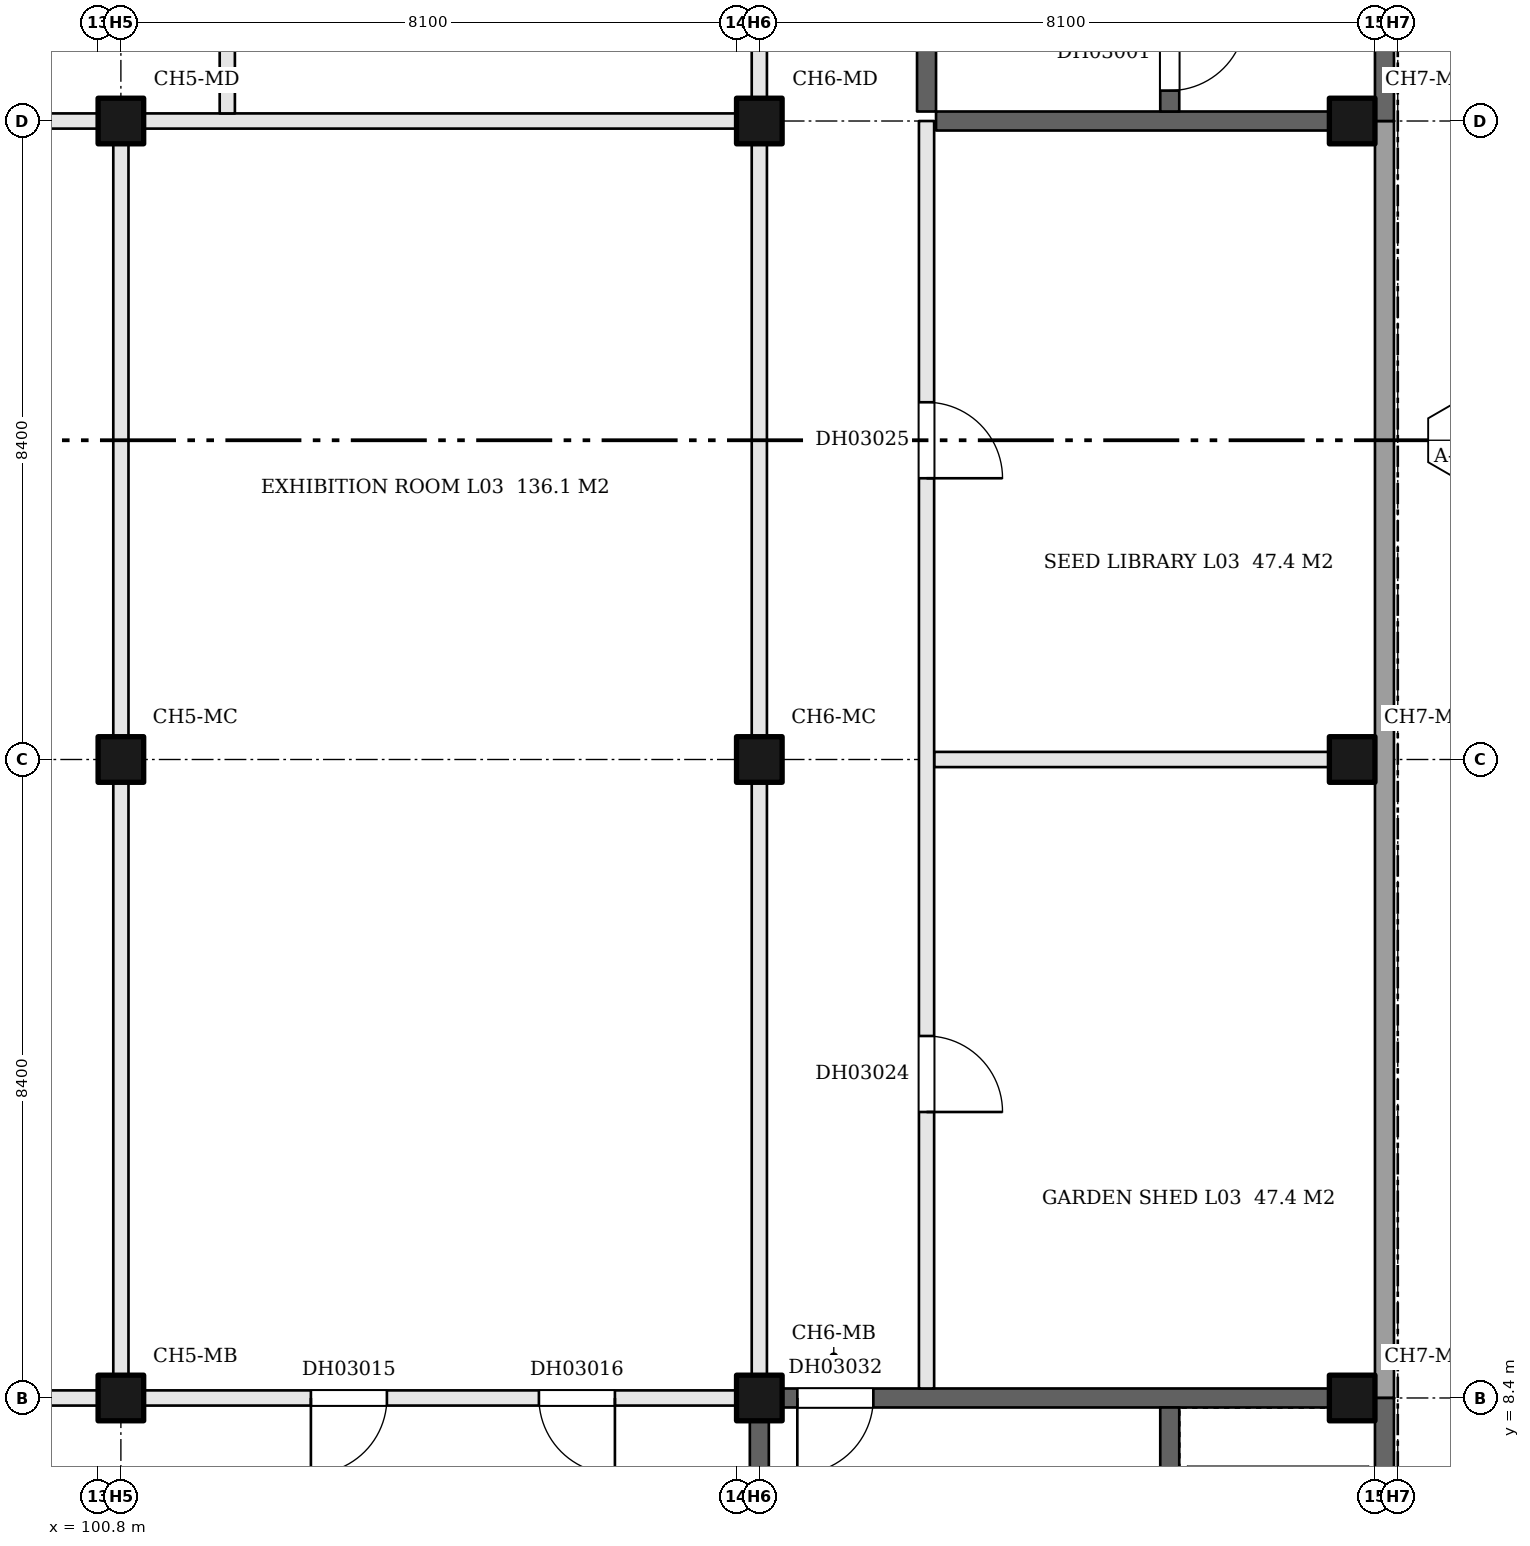
"""IFC4 building model, lengths in metres.
Left out: names, types, materials, properties, quantities, classifications, styles, units other than length and angle.
Written with IfcOpenShell. Run it as: python <this file> out.ifc"""

import sys

from ifc_helpers import new_model, si_unit, direction, frame, frame_2d, origin, origin_2d, place, context, subcontext, project, spatial, rectangle, extrude, element, fill, save


model = new_model("IFC4")
c1 = context("Model", 3, precision=1e-05, world=origin(), true_north=direction((0.0, 1.0)))
c2 = subcontext(c1, "Body", "Model", "MODEL_VIEW")
j1 = project(units=[si_unit("LENGTHUNIT", "METRE"), si_unit("PLANEANGLEUNIT", "RADIAN")], contexts=[c1])
p1 = place(None, origin())
s1 = spatial("IfcSite", under=j1, at=p1, CompositionType="ELEMENT")
p2 = place(p1, origin())
s2 = spatial("IfcBuilding", under=s1, at=p2, CompositionType="ELEMENT")
p3 = place(p2, frame((0.0, 0.0, 19.8)))
s3 = spatial("IfcBuildingStorey", under=s2, at=p3, CompositionType="ELEMENT", Elevation=19.8)
for number, where, z_axis, x_axis in (
    (1, (101.1, 8.4, 0.0), (0.0, 0.0, 1.0), (1.0, 0.0, 0.0)),
    (2, (101.1, 16.8, 0.0), (0.0, 0.0, 1.0), (1.0, 0.0, 0.0)),
    (3, (101.1, 25.2, 0.0), (0.0, 0.0, 1.0), (1.0, 0.0, 0.0)),
    (4, (109.5, 8.4, 0.0), (0.0, 0.0, 1.0), (1.0, 0.0, 0.0)),
    (5, (109.5, 16.8, 0.0), (0.0, 0.0, 1.0), (1.0, 0.0, 0.0)),
    (6, (109.5, 25.2, 0.0), (0.0, 0.0, 1.0), (1.0, 0.0, 0.0)),
    (7, (117.3, 8.4, 0.0), (0.0, 0.0, 1.0), (1.0, 0.0, 0.0)),
    (8, (117.3, 16.8, 0.0), (0.0, 0.0, 1.0), (1.0, 0.0, 0.0)),
    (9, (117.3, 25.2, 0.0), (0.0, 0.0, 1.0), (1.0, 0.0, 0.0)),
):
    element("IfcColumn", number, at=place(p3, frame(where, z_axis=z_axis, x_axis=x_axis)), inside=s3, PredefinedType="COLUMN", context=c2, shape_type="SweptSolid", body=[
        extrude(rectangle(XDim=0.6, YDim=0.6, at=origin_2d()), origin(), (0.0, 0.0, 1.0), 5.0),
    ])
p4 = place(p3, frame((93.0, 8.4, 0.0), z_axis=(0.0, 0.0, 1.0), x_axis=(1.0, 0.0, 0.0)))
e10 = element("IfcWall", 10, at=p4, inside=s3, PredefinedType="PARTITIONING", context=c2, shape_type="SweptSolid", body=[
    extrude(rectangle(XDim=7.8, YDim=0.2, at=frame_2d((3.9, 0.0))), origin(), (0.0, 0.0, 1.0), 5.0),
])
p5 = place(p4, frame((2.2, 0.0, 0.0)))
e11 = element("IfcOpeningElement", 11, at=p5, cuts=e10, PredefinedType="OPENING", context=c2, shape_type="SweptSolid", body=[
    extrude(rectangle(XDim=1.0, YDim=2.1, at=frame_2d((0.5, 1.05))), frame((0.0, 0.11, 0.0), z_axis=(0.0, -1.0, 0.0), x_axis=(1.0, 0.0, 0.0)), (0.0, 0.0, 1.0), 0.22),
])
p6 = place(p4, frame((5.2, 0.0, 0.0)))
e12 = element("IfcOpeningElement", 12, at=p6, cuts=e10, PredefinedType="OPENING", context=c2, shape_type="SweptSolid", body=[
    extrude(rectangle(XDim=1.0, YDim=2.1, at=frame_2d((0.5, 1.05))), frame((0.0, 0.11, 0.0), z_axis=(0.0, -1.0, 0.0), x_axis=(1.0, 0.0, 0.0)), (0.0, 0.0, 1.0), 0.22),
])
p7 = place(p3, frame((101.4, 8.4, 0.0), z_axis=(0.0, 0.0, 1.0), x_axis=(1.0, 0.0, 0.0)))
e13 = element("IfcWall", 13, at=p7, inside=s3, PredefinedType="PARTITIONING", context=c2, shape_type="SweptSolid", body=[
    extrude(rectangle(XDim=7.8, YDim=0.2, at=frame_2d((3.9, 0.0))), origin(), (0.0, 0.0, 1.0), 5.0),
])
p8 = place(p7, frame((2.2, 0.0, 0.0)))
e14 = element("IfcOpeningElement", 14, at=p8, cuts=e13, PredefinedType="OPENING", context=c2, shape_type="SweptSolid", body=[
    extrude(rectangle(XDim=1.0, YDim=2.1, at=frame_2d((0.5, 1.05))), frame((0.0, 0.11, 0.0), z_axis=(0.0, -1.0, 0.0), x_axis=(1.0, 0.0, 0.0)), (0.0, 0.0, 1.0), 0.22),
])
p9 = place(p7, frame((5.2, 0.0, 0.0)))
e15 = element("IfcOpeningElement", 15, at=p9, cuts=e13, PredefinedType="OPENING", context=c2, shape_type="SweptSolid", body=[
    extrude(rectangle(XDim=1.0, YDim=2.1, at=frame_2d((0.5, 1.05))), frame((0.0, 0.11, 0.0), z_axis=(0.0, -1.0, 0.0), x_axis=(1.0, 0.0, 0.0)), (0.0, 0.0, 1.0), 0.22),
])
p10 = place(p3, frame((109.8, 8.4, 0.0), z_axis=(0.0, 0.0, 1.0), x_axis=(1.0, 0.0, 0.0)))
e16 = element("IfcWall", 16, at=p10, inside=s3, PredefinedType="SHEAR", context=c2, shape_type="SweptSolid", body=[
    extrude(rectangle(XDim=7.2, YDim=0.25, at=frame_2d((3.6, 0.0))), origin(), (0.0, 0.0, 1.0), 5.0),
])
p11 = place(p10, frame((0.2, 0.0, 0.0)))
e17 = element("IfcOpeningElement", 17, at=p11, cuts=e16, PredefinedType="OPENING", context=c2, shape_type="SweptSolid", body=[
    extrude(rectangle(XDim=1.0, YDim=2.1, at=frame_2d((0.5, 1.05))), frame((0.0, 0.135, 0.0), z_axis=(0.0, -1.0, 0.0), x_axis=(1.0, 0.0, 0.0)), (0.0, 0.0, 1.0), 0.27),
])
p12 = place(p3, frame((111.8, 16.8, 0.0), z_axis=(0.0, 0.0, 1.0), x_axis=(1.0, 0.0, 0.0)))
e18 = element("IfcWall", 18, at=p12, inside=s3, PredefinedType="PARTITIONING", context=c2, shape_type="SweptSolid", body=[
    extrude(rectangle(XDim=5.2, YDim=0.2, at=frame_2d((2.6, 0.0))), origin(), (0.0, 0.0, 1.0), 5.0),
])
for number, where, z_axis, x_axis in (
    (19, (93.0, 25.2, 0.0), (0.0, 0.0, 1.0), (1.0, 0.0, 0.0)),
    (20, (101.4, 25.2, 0.0), (0.0, 0.0, 1.0), (1.0, 0.0, 0.0)),
):
    element("IfcWall", number, at=place(p3, frame(where, z_axis=z_axis, x_axis=x_axis)), inside=s3, PredefinedType="PARTITIONING", context=c2, shape_type="SweptSolid", body=[
        extrude(rectangle(XDim=7.8, YDim=0.2, at=frame_2d((3.9, 0.0))), origin(), (0.0, 0.0, 1.0), 5.0),
    ])
p13 = place(p3, frame((111.825, 25.2, 0.0), z_axis=(0.0, 0.0, 1.0), x_axis=(1.0, 0.0, 0.0)))
e21 = element("IfcWall", 21, at=p13, inside=s3, PredefinedType="SHEAR", context=c2, shape_type="SweptSolid", body=[
    extrude(rectangle(XDim=5.175, YDim=0.25, at=frame_2d((2.587, 0.0))), origin(), (0.0, 0.0, 1.0), 5.0),
])
p14 = place(p3, frame((101.1, 8.7, 0.0), z_axis=(0.0, 0.0, 1.0), x_axis=(0.0, 1.0, 0.0)))
e22 = element("IfcWall", 22, at=p14, inside=s3, PredefinedType="PARTITIONING", context=c2, shape_type="SweptSolid", body=[
    extrude(rectangle(XDim=7.8, YDim=0.2, at=frame_2d((3.9, 0.0))), origin(), (0.0, 0.0, 1.0), 5.0),
])
p15 = place(p3, frame((101.1, 17.1, 0.0), z_axis=(0.0, 0.0, 1.0), x_axis=(0.0, 1.0, 0.0)))
e23 = element("IfcWall", 23, at=p15, inside=s3, PredefinedType="PARTITIONING", context=c2, shape_type="SweptSolid", body=[
    extrude(rectangle(XDim=7.8, YDim=0.2, at=frame_2d((3.9, 0.0))), origin(), (0.0, 0.0, 1.0), 5.0),
])
p16 = place(p3, frame((102.5, 25.3, 0.0), z_axis=(0.0, 0.0, 1.0), x_axis=(0.0, 1.0, 0.0)))
e24 = element("IfcWall", 24, at=p16, inside=s3, PredefinedType="PARTITIONING", context=c2, shape_type="SweptSolid", body=[
    extrude(rectangle(XDim=4.4, YDim=0.2, at=frame_2d((2.2, 0.0))), origin(), (0.0, 0.0, 1.0), 5.0),
])
p17 = place(p3, frame((109.5, 0.9, 0.0), z_axis=(0.0, 0.0, 1.0), x_axis=(0.0, 1.0, 0.0)))
e25 = element("IfcWall", 25, at=p17, inside=s3, PredefinedType="SHEAR", context=c2, shape_type="SweptSolid", body=[
    extrude(rectangle(XDim=7.2, YDim=0.25, at=frame_2d((3.6, 0.0))), origin(), (0.0, 0.0, 1.0), 5.0),
])
p18 = place(p17, frame((4.3, 0.0, 0.0)))
e26 = element("IfcOpeningElement", 26, at=p18, cuts=e25, PredefinedType="OPENING", context=c2, shape_type="SweptSolid", body=[
    extrude(rectangle(XDim=1.4, YDim=2.1, at=frame_2d((0.7, 1.05))), frame((0.0, 0.135, 0.0), z_axis=(0.0, -1.0, 0.0), x_axis=(1.0, 0.0, 0.0)), (0.0, 0.0, 1.0), 0.27),
])
p19 = place(p3, frame((109.5, 8.7, 0.0), z_axis=(0.0, 0.0, 1.0), x_axis=(0.0, 1.0, 0.0)))
e27 = element("IfcWall", 27, at=p19, inside=s3, PredefinedType="PARTITIONING", context=c2, shape_type="SweptSolid", body=[
    extrude(rectangle(XDim=7.8, YDim=0.2, at=frame_2d((3.9, 0.0))), origin(), (0.0, 0.0, 1.0), 5.0),
])
p20 = place(p3, frame((109.5, 17.1, 0.0), z_axis=(0.0, 0.0, 1.0), x_axis=(0.0, 1.0, 0.0)))
e28 = element("IfcWall", 28, at=p20, inside=s3, PredefinedType="PARTITIONING", context=c2, shape_type="SweptSolid", body=[
    extrude(rectangle(XDim=7.8, YDim=0.2, at=frame_2d((3.9, 0.0))), origin(), (0.0, 0.0, 1.0), 5.0),
])
p21 = place(p3, frame((109.5, 25.5, 0.0), z_axis=(0.0, 0.0, 1.0), x_axis=(0.0, 1.0, 0.0)))
e29 = element("IfcWall", 29, at=p21, inside=s3, PredefinedType="PARTITIONING", context=c2, shape_type="SweptSolid", body=[
    extrude(rectangle(XDim=7.2, YDim=0.2, at=frame_2d((3.6, 0.0))), origin(), (0.0, 0.0, 1.0), 5.0),
])
p22 = place(p21, frame((5.5, 0.0, 0.0)))
e30 = element("IfcOpeningElement", 30, at=p22, cuts=e29, PredefinedType="OPENING", context=c2, shape_type="SweptSolid", body=[
    extrude(rectangle(XDim=1.4, YDim=2.1, at=frame_2d((0.7, 1.05))), frame((0.0, 0.11, 0.0), z_axis=(0.0, -1.0, 0.0), x_axis=(1.0, 0.0, 0.0)), (0.0, 0.0, 1.0), 0.22),
])
p23 = place(p3, frame((111.7, 8.525, 0.0), z_axis=(0.0, 0.0, 1.0), x_axis=(0.0, 1.0, 0.0)))
e31 = element("IfcWall", 31, at=p23, inside=s3, PredefinedType="PARTITIONING", context=c2, shape_type="SweptSolid", body=[
    extrude(rectangle(XDim=16.675, YDim=0.2, at=frame_2d((8.337, 0.0))), origin(), (0.0, 0.0, 1.0), 5.0),
])
p24 = place(p23, frame((3.637, 0.0, 0.0)))
e32 = element("IfcOpeningElement", 32, at=p24, cuts=e31, PredefinedType="OPENING", context=c2, shape_type="SweptSolid", body=[
    extrude(rectangle(XDim=1.0, YDim=2.1, at=frame_2d((0.5, 1.05))), frame((0.0, 0.11, 0.0), z_axis=(0.0, -1.0, 0.0), x_axis=(1.0, 0.0, 0.0)), (0.0, 0.0, 1.0), 0.22),
])
p25 = place(p23, frame((11.975, 0.0, 0.0)))
e33 = element("IfcOpeningElement", 33, at=p25, cuts=e31, PredefinedType="OPENING", context=c2, shape_type="SweptSolid", body=[
    extrude(rectangle(XDim=1.0, YDim=2.1, at=frame_2d((0.5, 1.05))), frame((0.0, 0.11, 0.0), z_axis=(0.0, -1.0, 0.0), x_axis=(1.0, 0.0, 0.0)), (0.0, 0.0, 1.0), 0.22),
])
p26 = place(p3, frame((111.7, 25.325, 0.0), z_axis=(0.0, 0.0, 1.0), x_axis=(0.0, 1.0, 0.0)))
e34 = element("IfcWall", 34, at=p26, inside=s3, PredefinedType="SHEAR", context=c2, shape_type="SweptSolid", body=[
    extrude(rectangle(XDim=8.275, YDim=0.25, at=frame_2d((4.138, 0.0))), origin(), (0.0, 0.0, 1.0), 5.0),
])
p27 = place(p26, frame((5.075, 0.0, 0.0)))
e35 = element("IfcOpeningElement", 35, at=p27, cuts=e34, PredefinedType="OPENING", context=c2, shape_type="SweptSolid", body=[
    extrude(rectangle(XDim=1.2, YDim=2.1, at=frame_2d((0.6, 1.05))), frame((0.0, 0.135, 0.0), z_axis=(0.0, -1.0, 0.0), x_axis=(1.0, 0.0, 0.0)), (0.0, 0.0, 1.0), 0.27),
])
p28 = place(p3, frame((114.9, 3.125, 0.0), z_axis=(0.0, 0.0, 1.0), x_axis=(0.0, 1.0, 0.0)))
e36 = element("IfcWall", 36, at=p28, inside=s3, PredefinedType="SHEAR", context=c2, shape_type="SweptSolid", body=[
    extrude(rectangle(XDim=5.15, YDim=0.25, at=frame_2d((2.575, 0.0))), origin(), (0.0, 0.0, 1.0), 5.0),
])
p29 = place(p28, frame((3.075, 0.0, 0.0)))
e37 = element("IfcOpeningElement", 37, at=p29, cuts=e36, PredefinedType="OPENING", context=c2, shape_type="SweptSolid", body=[
    extrude(rectangle(XDim=1.1, YDim=2.1, at=frame_2d((0.55, 1.05))), frame((0.0, 0.135, 0.0), z_axis=(0.0, -1.0, 0.0), x_axis=(1.0, 0.0, 0.0)), (0.0, 0.0, 1.0), 0.27),
])
p30 = place(p28, frame((0.475, 0.0, 0.0)))
e38 = element("IfcOpeningElement", 38, at=p30, cuts=e36, PredefinedType="OPENING", context=c2, shape_type="SweptSolid", body=[
    extrude(rectangle(XDim=0.9, YDim=2.1, at=frame_2d((0.45, 1.05))), frame((0.0, 0.135, 0.0), z_axis=(0.0, -1.0, 0.0), x_axis=(1.0, 0.0, 0.0)), (0.0, 0.0, 1.0), 0.27),
])
p31 = place(p3, frame((114.9, 25.325, 0.0), z_axis=(0.0, 0.0, 1.0), x_axis=(0.0, 1.0, 0.0)))
e39 = element("IfcWall", 39, at=p31, inside=s3, PredefinedType="SHEAR", context=c2, shape_type="SweptSolid", body=[
    extrude(rectangle(XDim=8.275, YDim=0.25, at=frame_2d((4.138, 0.0))), origin(), (0.0, 0.0, 1.0), 5.0),
])
p32 = place(p31, frame((0.275, 0.0, 0.0)))
e40 = element("IfcOpeningElement", 40, at=p32, cuts=e39, PredefinedType="OPENING", context=c2, shape_type="SweptSolid", body=[
    extrude(rectangle(XDim=1.0, YDim=2.1, at=frame_2d((0.5, 1.05))), frame((0.0, 0.135, 0.0), z_axis=(0.0, -1.0, 0.0), x_axis=(1.0, 0.0, 0.0)), (0.0, 0.0, 1.0), 0.27),
])
p33 = place(p3, frame((117.725, 0.05, 0.0), z_axis=(0.0, 0.0, 1.0), x_axis=(0.0, 1.0, 0.0)))
e41 = element("IfcWall", 41, at=p33, inside=s3, PredefinedType="SHEAR", context=c2, shape_type="SweptSolid", body=[
    extrude(rectangle(XDim=8.35, YDim=0.25, at=frame_2d((4.175, 0.0))), origin(), (0.0, 0.0, 1.0), 5.0),
])
p34 = place(p3, frame((117.725, 8.4, 0.0), z_axis=(0.0, 0.0, 1.0), x_axis=(0.0, 1.0, 0.0)))
e42 = element("IfcWall", 42, at=p34, inside=s3, PredefinedType="SOLIDWALL", context=c2, shape_type="SweptSolid", body=[
    extrude(rectangle(XDim=16.8, YDim=0.25, at=frame_2d((8.4, 0.0))), origin(), (0.0, 0.0, 1.0), 5.0),
])
p35 = place(p3, frame((117.725, 25.2, 0.0), z_axis=(0.0, 0.0, 1.0), x_axis=(0.0, 1.0, 0.0)))
e43 = element("IfcWall", 43, at=p35, inside=s3, PredefinedType="SHEAR", context=c2, shape_type="SweptSolid", body=[
    extrude(rectangle(XDim=8.35, YDim=0.25, at=frame_2d((4.175, 0.0))), origin(), (0.0, 0.0, 1.0), 5.0),
])
p36 = place(p32, frame((1.0, 0.0, 0.0), z_axis=(0.0, 0.0, 1.0), x_axis=(-1.0, 0.0, 0.0)))
e44 = element("IfcDoor", 44, at=p36, inside=s3, OperationType="SINGLE_SWING_LEFT", PredefinedType="DOOR", context=c2, shape_type="SweptSolid", body=[
    extrude(rectangle(XDim=1.0, YDim=2.1, at=frame_2d((0.5, 1.05))), frame((0.0, 0.025, 0.0), z_axis=(0.0, -1.0, 0.0), x_axis=(1.0, 0.0, 0.0)), (0.0, 0.0, 1.0), 0.05),
])
fill(e40, e44)
p37 = place(p8, frame((1.0, 0.0, 0.0), z_axis=(0.0, 0.0, 1.0), x_axis=(-1.0, 0.0, 0.0)))
e45 = element("IfcDoor", 45, at=p37, inside=s3, OperationType="SINGLE_SWING_RIGHT", PredefinedType="DOOR", context=c2, shape_type="SweptSolid", body=[
    extrude(rectangle(XDim=1.0, YDim=2.1, at=frame_2d((0.5, 1.05))), frame((0.0, 0.025, 0.0), z_axis=(0.0, -1.0, 0.0), x_axis=(1.0, 0.0, 0.0)), (0.0, 0.0, 1.0), 0.05),
])
fill(e14, e45)
p38 = place(p9, frame((1.0, 0.0, 0.0), z_axis=(0.0, 0.0, 1.0), x_axis=(-1.0, 0.0, 0.0)))
e46 = element("IfcDoor", 46, at=p38, inside=s3, OperationType="SINGLE_SWING_LEFT", PredefinedType="DOOR", context=c2, shape_type="SweptSolid", body=[
    extrude(rectangle(XDim=1.0, YDim=2.1, at=frame_2d((0.5, 1.05))), frame((0.0, 0.025, 0.0), z_axis=(0.0, -1.0, 0.0), x_axis=(1.0, 0.0, 0.0)), (0.0, 0.0, 1.0), 0.05),
])
fill(e15, e46)
p39 = place(p24, frame((1.0, 0.0, 0.0), z_axis=(0.0, 0.0, 1.0), x_axis=(-1.0, 0.0, 0.0)))
e47 = element("IfcDoor", 47, at=p39, inside=s3, OperationType="SINGLE_SWING_RIGHT", PredefinedType="DOOR", context=c2, shape_type="SweptSolid", body=[
    extrude(rectangle(XDim=1.0, YDim=2.1, at=frame_2d((0.5, 1.05))), frame((0.0, 0.025, 0.0), z_axis=(0.0, -1.0, 0.0), x_axis=(1.0, 0.0, 0.0)), (0.0, 0.0, 1.0), 0.05),
])
fill(e32, e47)
p40 = place(p25, frame((1.0, 0.0, 0.0), z_axis=(0.0, 0.0, 1.0), x_axis=(-1.0, 0.0, 0.0)))
e48 = element("IfcDoor", 48, at=p40, inside=s3, OperationType="SINGLE_SWING_RIGHT", PredefinedType="DOOR", context=c2, shape_type="SweptSolid", body=[
    extrude(rectangle(XDim=1.0, YDim=2.1, at=frame_2d((0.5, 1.05))), frame((0.0, 0.025, 0.0), z_axis=(0.0, -1.0, 0.0), x_axis=(1.0, 0.0, 0.0)), (0.0, 0.0, 1.0), 0.05),
])
fill(e33, e48)
p41 = place(p11, frame((1.0, 0.0, 0.0), z_axis=(0.0, 0.0, 1.0), x_axis=(-1.0, 0.0, 0.0)))
e49 = element("IfcDoor", 49, at=p41, inside=s3, OperationType="SINGLE_SWING_RIGHT", PredefinedType="DOOR", context=c2, shape_type="SweptSolid", body=[
    extrude(rectangle(XDim=1.0, YDim=2.1, at=frame_2d((0.5, 1.05))), frame((0.0, 0.025, 0.0), z_axis=(0.0, -1.0, 0.0), x_axis=(1.0, 0.0, 0.0)), (0.0, 0.0, 1.0), 0.05),
])
fill(e17, e49)
save(model, sys.argv[1])
